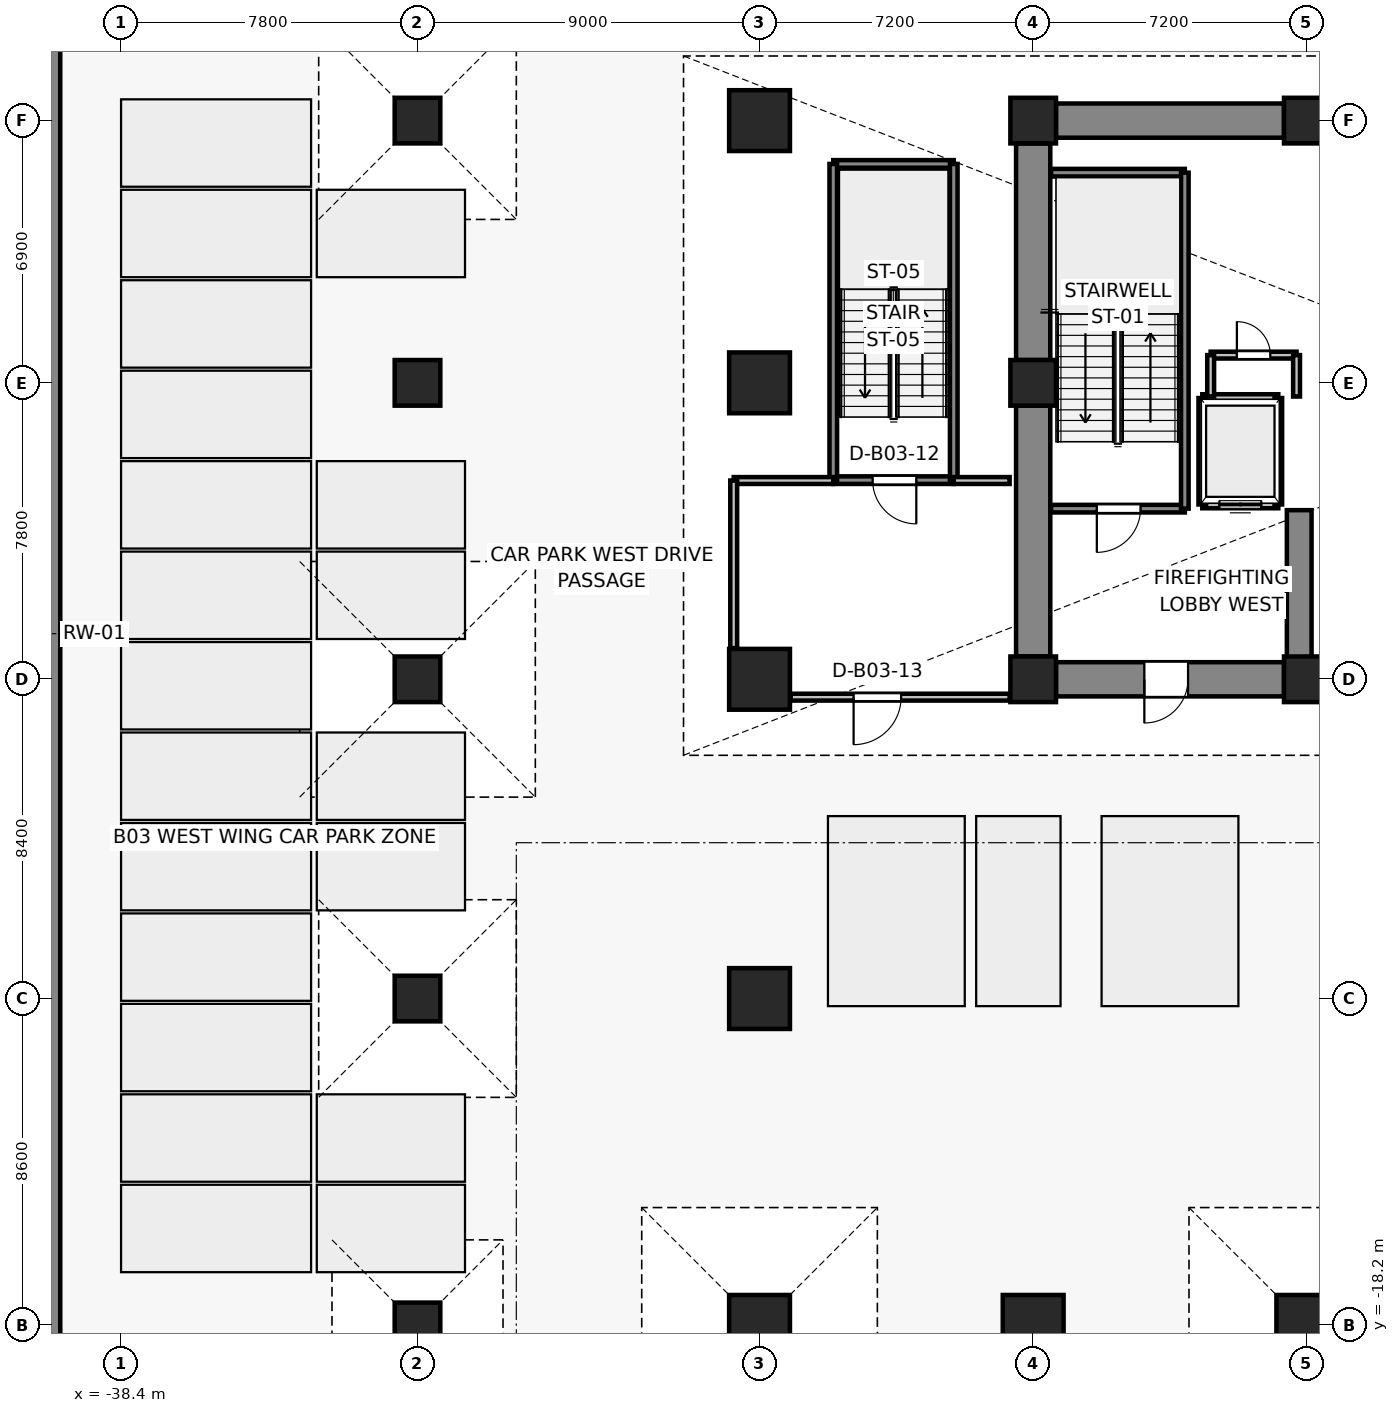
"""IFC4 building model, lengths in metres.
Left out: names, types, materials, properties, quantities, classifications, styles, units other than length and angle.
Written with IfcOpenShell. Run it as: python <this file> out.ifc"""

import sys

from ifc_helpers import new_model, si_unit, direction, frame, frame_2d, origin, origin_2d, place, context, subcontext, project, spatial, rectangle, extrude, source, transform, mapped, element, fill, save


model = new_model("IFC4")
c1 = context("Model", 3, precision=1e-05, world=origin(), true_north=direction((0.0, 1.0)))
c2 = subcontext(c1, "Body", "Model", "MODEL_VIEW")
j1 = project(units=[si_unit("LENGTHUNIT", "METRE"), si_unit("PLANEANGLEUNIT", "RADIAN")], contexts=[c1])
p1 = place(None, origin())
s1 = spatial("IfcSite", under=j1, at=p1, CompositionType="ELEMENT")
p2 = place(p1, origin())
s2 = spatial("IfcBuilding", under=s1, at=p2, CompositionType="ELEMENT")
p3 = place(p2, frame((0.0, 0.0, -13.2)))
s3 = spatial("IfcBuildingStorey", under=s2, at=p3, CompositionType="ELEMENT", Elevation=-13.2)
p4 = place(p3, frame((-40.4, -22.8, 0.0), z_axis=(0.0, 0.0, 1.0), x_axis=(0.0, 1.0, 0.0)))
e1 = element("IfcWall", 1, at=p4, inside=s3, PredefinedType="USERDEFINED", context=c2, shape_type="SweptSolid", body=[
    extrude(rectangle(XDim=45.6, YDim=0.8, at=frame_2d((22.8, 0.0))), origin(), (0.0, 0.0, 1.0), 4.12),
])
for number, where, z_axis, x_axis in (
    (2, (-14.4, -1.2, 0.0), (0.0, 0.0, 1.0), (1.0, 0.0, 0.0)),
    (3, (-7.2, -1.2, 0.0), (0.0, 0.0, 1.0), (1.0, 0.0, 0.0)),
    (4, (-14.4, 6.6, 0.0), (0.0, 0.0, 1.0), (1.0, 0.0, 0.0)),
    (5, (-14.4, 13.5, 0.0), (0.0, 0.0, 1.0), (1.0, 0.0, 0.0)),
    (6, (-7.2, 13.5, 0.0), (0.0, 0.0, 1.0), (1.0, 0.0, 0.0)),
):
    element("IfcColumn", number, at=place(p3, frame(where, z_axis=z_axis, x_axis=x_axis)), inside=s3, PredefinedType="COLUMN", context=c2, shape_type="SweptSolid", body=[
        extrude(rectangle(XDim=1.2, YDim=1.2, at=origin_2d()), origin(), (0.0, 0.0, 1.0), 4.4),
    ])
for number, where, z_axis, x_axis in (
    (7, (-21.6, -18.2, 0.0), (0.0, 0.0, 1.0), (1.0, 0.0, 0.0)),
    (8, (-14.4, -18.2, 0.0), (0.0, 0.0, 1.0), (1.0, 0.0, 0.0)),
    (9, (-7.2, -18.2, 0.0), (0.0, 0.0, 1.0), (1.0, 0.0, 0.0)),
    (10, (-21.6, -9.6, 0.0), (0.0, 0.0, 1.0), (1.0, 0.0, 0.0)),
    (11, (-21.6, -1.2, 0.0), (0.0, 0.0, 1.0), (1.0, 0.0, 0.0)),
    (12, (-21.6, 6.6, 0.0), (0.0, 0.0, 1.0), (1.0, 0.0, 0.0)),
    (13, (-21.6, 13.5, 0.0), (0.0, 0.0, 1.0), (1.0, 0.0, 0.0)),
):
    element("IfcColumn", number, at=place(p3, frame(where, z_axis=z_axis, x_axis=x_axis)), inside=s3, PredefinedType="COLUMN", context=c2, shape_type="SweptSolid", body=[
        extrude(rectangle(XDim=1.6, YDim=1.6, at=origin_2d()), origin(), (0.0, 0.0, 1.0), 4.4),
    ])
for number, where, z_axis, x_axis in (
    (14, (-30.6, -18.2, 0.0), (0.0, 0.0, 1.0), (1.0, 0.0, 0.0)),
    (15, (-30.6, -9.6, 0.0), (0.0, 0.0, 1.0), (1.0, 0.0, 0.0)),
    (16, (-30.6, -1.2, 0.0), (0.0, 0.0, 1.0), (1.0, 0.0, 0.0)),
    (17, (-30.6, 6.6, 0.0), (0.0, 0.0, 1.0), (1.0, 0.0, 0.0)),
    (18, (-30.6, 13.5, 0.0), (0.0, 0.0, 1.0), (1.0, 0.0, 0.0)),
):
    element("IfcColumn", number, at=place(p3, frame(where, z_axis=z_axis, x_axis=x_axis)), inside=s3, PredefinedType="COLUMN", context=c2, shape_type="SweptSolid", body=[
        extrude(rectangle(XDim=1.2, YDim=1.2, at=origin_2d()), origin(), (0.0, 0.0, 1.0), 4.4),
    ])
p5 = place(p3, frame((-13.8, 13.5, 0.0), z_axis=(0.0, 0.0, 1.0), x_axis=(1.0, 0.0, 0.0)))
e19 = element("IfcWall", 19, at=p5, inside=s3, PredefinedType="SHEAR", context=c2, shape_type="SweptSolid", body=[
    extrude(rectangle(XDim=6.0, YDim=0.9, at=frame_2d((3.0, 0.0))), origin(), (0.0, 0.0, 1.0), 4.12),
])
p6 = place(p3, frame((-14.4, -0.6, 0.0), z_axis=(0.0, 0.0, 1.0), x_axis=(0.0, 1.0, 0.0)))
e20 = element("IfcWall", 20, at=p6, inside=s3, PredefinedType="SHEAR", context=c2, shape_type="SweptSolid", body=[
    extrude(rectangle(XDim=6.6, YDim=0.9, at=frame_2d((3.3, 0.0))), origin(), (0.0, 0.0, 1.0), 4.12),
])
p7 = place(p3, frame((-14.4, 7.2, 0.0), z_axis=(0.0, 0.0, 1.0), x_axis=(0.0, 1.0, 0.0)))
e21 = element("IfcWall", 21, at=p7, inside=s3, PredefinedType="SHEAR", context=c2, shape_type="SweptSolid", body=[
    extrude(rectangle(XDim=5.7, YDim=0.9, at=frame_2d((2.85, 0.0))), origin(), (0.0, 0.0, 1.0), 4.12),
])
p8 = place(p3, frame((-7.8, -1.2, 0.0), z_axis=(0.0, 0.0, 1.0), x_axis=(-1.0, 0.0, 0.0)))
e22 = element("IfcWall", 22, at=p8, inside=s3, PredefinedType="SHEAR", context=c2, shape_type="SweptSolid", body=[
    extrude(rectangle(XDim=6.0, YDim=0.9, at=frame_2d((3.0, 0.0))), origin(), (0.0, 0.0, 1.0), 4.12),
])
p9 = place(p8, frame((2.525, 0.0, 0.0)))
e23 = element("IfcOpeningElement", 23, at=p9, cuts=e22, PredefinedType="OPENING", context=c2, shape_type="SweptSolid", body=[
    extrude(rectangle(XDim=1.15, YDim=2.15, at=frame_2d((0.575, 1.075))), frame((0.0, 0.46, 0.0), z_axis=(0.0, -1.0, 0.0), x_axis=(1.0, 0.0, 0.0)), (0.0, 0.0, 1.0), 0.92),
])
p10 = place(p3, frame((-7.4, -0.75, 0.0), z_axis=(0.0, 0.0, 1.0), x_axis=(0.0, 1.0, 0.0)))
e24 = element("IfcWall", 24, at=p10, inside=s3, PredefinedType="SHEAR", context=c2, shape_type="SweptSolid", body=[
    extrude(rectangle(XDim=4.0, YDim=0.65, at=frame_2d((2.0, 0.0))), origin(), (0.0, 0.0, 1.0), 4.12),
])
p11 = place(p3, frame((-7.95, 3.4, 0.0), z_axis=(0.0, 0.0, 1.0), x_axis=(-1.0, 0.0, 0.0)))
e25 = element("IfcWall", 25, at=p11, inside=s3, PredefinedType="SOLIDWALL", context=c2, shape_type="SweptSolid", body=[
    extrude(rectangle(XDim=2.0, YDim=0.2, at=frame_2d((1.0, 0.0))), origin(), (0.0, 0.0, 1.0), 4.12),
])
p12 = place(p11, frame((0.45, 0.0, 0.0)))
e26 = element("IfcOpeningElement", 26, at=p12, cuts=e25, PredefinedType="OPENING", context=c2, shape_type="SweptSolid", body=[
    extrude(rectangle(XDim=1.1, YDim=2.2, at=frame_2d((0.55, 1.1))), frame((0.0, 0.11, 0.0), z_axis=(0.0, -1.0, 0.0), x_axis=(1.0, 0.0, 0.0)), (0.0, 0.0, 1.0), 0.22),
])
p13 = place(p3, frame((-9.95, 6.2, 0.0), z_axis=(0.0, 0.0, 1.0), x_axis=(1.0, 0.0, 0.0)))
e27 = element("IfcWall", 27, at=p13, inside=s3, PredefinedType="SOLIDWALL", context=c2, shape_type="SweptSolid", body=[
    extrude(rectangle(XDim=2.0, YDim=0.2, at=frame_2d((1.0, 0.0))), origin(), (0.0, 0.0, 1.0), 4.12),
])
for number, where, z_axis, x_axis in (
    (28, (-9.95, 3.4, 0.0), (0.0, 0.0, 1.0), (0.0, 1.0, 0.0)),
    (29, (-7.95, 6.2, 0.0), (0.0, 0.0, 1.0), (0.0, -1.0, 0.0)),
):
    element("IfcWall", number, at=place(p3, frame(where, z_axis=z_axis, x_axis=x_axis)), inside=s3, PredefinedType="SOLIDWALL", context=c2, shape_type="SweptSolid", body=[
        extrude(rectangle(XDim=2.8, YDim=0.2, at=frame_2d((1.4, 0.0))), origin(), (0.0, 0.0, 1.0), 4.12),
    ])
p14 = place(p3, frame((-10.41, 3.29, 0.0), z_axis=(0.0, 0.0, 1.0), x_axis=(-1.0, 0.0, 0.0)))
e30 = element("IfcWall", 30, at=p14, inside=s3, PredefinedType="SOLIDWALL", context=c2, shape_type="SweptSolid", body=[
    extrude(rectangle(XDim=3.52, YDim=0.2, at=frame_2d((1.76, 0.0))), origin(), (0.0, 0.0, 1.0), 4.12),
])
p15 = place(p14, frame((1.165, 0.0, 0.0)))
e31 = element("IfcOpeningElement", 31, at=p15, cuts=e30, PredefinedType="OPENING", context=c2, shape_type="SweptSolid", body=[
    extrude(rectangle(XDim=1.15, YDim=2.15, at=frame_2d((0.575, 1.075))), frame((0.0, 0.11, 0.0), z_axis=(0.0, -1.0, 0.0), x_axis=(1.0, 0.0, 0.0)), (0.0, 0.0, 1.0), 0.22),
])
p16 = place(p3, frame((-13.93, 12.13, 0.0), z_axis=(0.0, 0.0, 1.0), x_axis=(1.0, 0.0, 0.0)))
e32 = element("IfcWall", 32, at=p16, inside=s3, PredefinedType="SOLIDWALL", context=c2, shape_type="SweptSolid", body=[
    extrude(rectangle(XDim=3.52, YDim=0.2, at=frame_2d((1.76, 0.0))), origin(), (0.0, 0.0, 1.0), 4.12),
])
p17 = place(p3, frame((-10.41, 12.13, 0.0), z_axis=(0.0, 0.0, 1.0), x_axis=(0.0, -1.0, 0.0)))
e33 = element("IfcWall", 33, at=p17, inside=s3, PredefinedType="SOLIDWALL", context=c2, shape_type="SweptSolid", body=[
    extrude(rectangle(XDim=8.84, YDim=0.2, at=frame_2d((4.42, 0.0))), origin(), (0.0, 0.0, 1.0), 4.12),
])
p18 = place(p3, frame((-9.73, 7.33, 0.0), z_axis=(0.0, 0.0, 1.0), x_axis=(1.0, 0.0, 0.0)))
e34 = element("IfcWall", 34, at=p18, inside=s3, PredefinedType="PARTITIONING", context=c2, shape_type="SweptSolid", body=[
    extrude(rectangle(XDim=2.26, YDim=0.18, at=frame_2d((1.13, 0.0))), origin(), (0.0, 0.0, 1.0), 3.41),
])
p19 = place(p18, frame((0.69, 0.0, 0.0)))
e35 = element("IfcOpeningElement", 35, at=p19, cuts=e34, PredefinedType="OPENING", context=c2, shape_type="SweptSolid", body=[
    extrude(rectangle(XDim=0.88, YDim=2.1, at=frame_2d((0.44, 1.05))), frame((0.0, 0.1, 0.0), z_axis=(0.0, -1.0, 0.0), x_axis=(1.0, 0.0, 0.0)), (0.0, 0.0, 1.0), 0.2),
])
p20 = place(p3, frame((-9.73, 6.24, 0.0), z_axis=(0.0, 0.0, 1.0), x_axis=(0.0, 1.0, 0.0)))
e36 = element("IfcWall", 36, at=p20, inside=s3, PredefinedType="PARTITIONING", context=c2, shape_type="SweptSolid", body=[
    extrude(rectangle(XDim=1.09, YDim=0.18, at=frame_2d((0.545, 0.0))), origin(), (0.0, 0.0, 1.0), 4.12),
])
p21 = place(p3, frame((-7.47, 7.33, 0.0), z_axis=(0.0, 0.0, 1.0), x_axis=(0.0, -1.0, 0.0)))
e37 = element("IfcWall", 37, at=p21, inside=s3, PredefinedType="PARTITIONING", context=c2, shape_type="SweptSolid", body=[
    extrude(rectangle(XDim=1.09, YDim=0.18, at=frame_2d((0.545, 0.0))), origin(), (0.0, 0.0, 1.0), 3.41),
])
p22 = place(p3, frame((-16.49, 4.04, 0.0), z_axis=(0.0, 0.0, 1.0), x_axis=(-1.0, 0.0, 0.0)))
e38 = element("IfcWall", 38, at=p22, inside=s3, PredefinedType="SOLIDWALL", context=c2, shape_type="SweptSolid", body=[
    extrude(rectangle(XDim=3.17, YDim=0.2, at=frame_2d((1.585, 0.0))), origin(), (0.0, 0.0, 1.0), 4.12),
])
p23 = place(p22, frame((0.985, 0.0, 0.0)))
e39 = element("IfcOpeningElement", 39, at=p23, cuts=e38, PredefinedType="OPENING", context=c2, shape_type="SweptSolid", body=[
    extrude(rectangle(XDim=1.15, YDim=2.15, at=frame_2d((0.575, 1.075))), frame((0.0, 0.11, 0.0), z_axis=(0.0, -1.0, 0.0), x_axis=(1.0, 0.0, 0.0)), (0.0, 0.0, 1.0), 0.22),
])
p24 = place(p3, frame((-19.66, 12.36, 0.0), z_axis=(0.0, 0.0, 1.0), x_axis=(1.0, 0.0, 0.0)))
e40 = element("IfcWall", 40, at=p24, inside=s3, PredefinedType="SOLIDWALL", context=c2, shape_type="SweptSolid", body=[
    extrude(rectangle(XDim=3.17, YDim=0.2, at=frame_2d((1.585, 0.0))), origin(), (0.0, 0.0, 1.0), 4.12),
])
for number, where, z_axis, x_axis in (
    (41, (-19.66, 4.04, 0.0), (0.0, 0.0, 1.0), (0.0, 1.0, 0.0)),
    (42, (-16.49, 12.36, 0.0), (0.0, 0.0, 1.0), (0.0, -1.0, 0.0)),
):
    element("IfcWall", number, at=place(p3, frame(where, z_axis=z_axis, x_axis=x_axis)), inside=s3, PredefinedType="SOLIDWALL", context=c2, shape_type="SweptSolid", body=[
        extrude(rectangle(XDim=8.32, YDim=0.2, at=frame_2d((4.16, 0.0))), origin(), (0.0, 0.0, 1.0), 4.12),
    ])
p25 = place(p3, frame((-15.02, -1.67, 0.0), z_axis=(0.0, 0.0, 1.0), x_axis=(-1.0, 0.0, 0.0)))
e43 = element("IfcWall", 43, at=p25, inside=s3, PredefinedType="PARTITIONING", context=c2, shape_type="SweptSolid", body=[
    extrude(rectangle(XDim=5.76, YDim=0.18, at=frame_2d((2.88, 0.0))), origin(), (0.0, 0.0, 1.0), 4.12),
])
p26 = place(p25, frame((2.855, 0.0, 0.0)))
e44 = element("IfcOpeningElement", 44, at=p26, cuts=e43, PredefinedType="OPENING", context=c2, shape_type="SweptSolid", body=[
    extrude(rectangle(XDim=1.25, YDim=2.15, at=frame_2d((0.625, 1.075))), frame((0.0, 0.1, 0.0), z_axis=(0.0, -1.0, 0.0), x_axis=(1.0, 0.0, 0.0)), (0.0, 0.0, 1.0), 0.2),
])
p27 = place(p3, frame((-22.28, 4.03, 0.0), z_axis=(0.0, 0.0, 1.0), x_axis=(1.0, 0.0, 0.0)))
e45 = element("IfcWall", 45, at=p27, inside=s3, PredefinedType="PARTITIONING", context=c2, shape_type="SweptSolid", body=[
    extrude(rectangle(XDim=2.62, YDim=0.18, at=frame_2d((1.31, 0.0))), origin(), (0.0, 0.0, 1.0), 3.41),
])
p28 = place(p3, frame((-16.49, 4.03, 0.0), z_axis=(0.0, 0.0, 1.0), x_axis=(1.0, 0.0, 0.0)))
e46 = element("IfcWall", 46, at=p28, inside=s3, PredefinedType="PARTITIONING", context=c2, shape_type="SweptSolid", body=[
    extrude(rectangle(XDim=1.47, YDim=0.18, at=frame_2d((0.735, 0.0))), origin(), (0.0, 0.0, 1.0), 4.12),
])
p29 = place(p3, frame((-22.28, -0.38, 0.0), z_axis=(0.0, 0.0, 1.0), x_axis=(0.0, 1.0, 0.0)))
e47 = element("IfcWall", 47, at=p29, inside=s3, PredefinedType="PARTITIONING", context=c2, shape_type="SweptSolid", body=[
    extrude(rectangle(XDim=4.41, YDim=0.18, at=frame_2d((2.205, 0.0))), origin(), (0.0, 0.0, 1.0), 3.493),
])
m1 = source(origin(), c2, "Body", "SweptSolid", [
    extrude(rectangle(XDim=1.1, YDim=2.2, at=frame_2d((0.55, 1.1))), frame((0.0, 0.025, 0.0), z_axis=(0.0, -1.0, 0.0), x_axis=(1.0, 0.0, 0.0)), (0.0, 0.0, 1.0), 0.05),
])
p30 = place(p12, origin())
e48 = element("IfcDoor", 48, at=p30, inside=s3, OperationType="DOUBLE_DOOR_SLIDING", PredefinedType="DOOR", context=c2, shape_type="MappedRepresentation", body=[
    mapped(m1, transform((0.0, 0.0, 0.0), x_axis=(1.0, 0.0, 0.0), y_axis=(0.0, 1.0, 0.0), z_axis=(0.0, 0.0, 1.0), scale=1.0)),
])
fill(e26, e48)
m2 = source(origin(), c2, "Body", "SweptSolid", [
    extrude(rectangle(XDim=1.15, YDim=2.15, at=frame_2d((0.575, 1.075))), frame((0.0, 0.025, 0.0), z_axis=(0.0, -1.0, 0.0), x_axis=(1.0, 0.0, 0.0)), (0.0, 0.0, 1.0), 0.05),
])
p31 = place(p15, origin())
e49 = element("IfcDoor", 49, at=p31, inside=s3, OperationType="SINGLE_SWING_RIGHT", PredefinedType="DOOR", context=c2, shape_type="MappedRepresentation", body=[
    mapped(m2, transform((0.0, 0.0, 0.0), x_axis=(1.0, 0.0, 0.0), y_axis=(0.0, 1.0, 0.0), z_axis=(0.0, 0.0, 1.0), scale=1.0)),
])
fill(e31, e49)
p32 = place(p9, origin())
e50 = element("IfcDoor", 50, at=p32, inside=s3, OperationType="SINGLE_SWING_RIGHT", PredefinedType="DOOR", context=c2, shape_type="MappedRepresentation", body=[
    mapped(m2, transform((0.0, 0.0, 0.0), x_axis=(1.0, 0.0, 0.0), y_axis=(0.0, 1.0, 0.0), z_axis=(0.0, 0.0, 1.0), scale=1.0)),
])
fill(e23, e50)
p33 = place(p23, origin())
e51 = element("IfcDoor", 51, at=p33, inside=s3, OperationType="SINGLE_SWING_LEFT", PredefinedType="DOOR", context=c2, shape_type="MappedRepresentation", body=[
    mapped(m2, transform((0.0, 0.0, 0.0), x_axis=(1.0, 0.0, 0.0), y_axis=(0.0, 1.0, 0.0), z_axis=(0.0, 0.0, 1.0), scale=1.0)),
])
fill(e39, e51)
m3 = source(origin(), c2, "Body", "SweptSolid", [
    extrude(rectangle(XDim=1.25, YDim=2.15, at=frame_2d((0.625, 1.075))), frame((0.0, 0.025, 0.0), z_axis=(0.0, -1.0, 0.0), x_axis=(1.0, 0.0, 0.0)), (0.0, 0.0, 1.0), 0.05),
])
p34 = place(p26, origin())
e52 = element("IfcDoor", 52, at=p34, inside=s3, OperationType="SINGLE_SWING_RIGHT", PredefinedType="DOOR", context=c2, shape_type="MappedRepresentation", body=[
    mapped(m3, transform((0.0, 0.0, 0.0), x_axis=(1.0, 0.0, 0.0), y_axis=(0.0, 1.0, 0.0), z_axis=(0.0, 0.0, 1.0), scale=1.0)),
])
fill(e44, e52)
m4 = source(origin(), c2, "Body", "SweptSolid", [
    extrude(rectangle(XDim=0.88, YDim=2.1, at=frame_2d((0.44, 1.05))), frame((0.0, 0.025, 0.0), z_axis=(0.0, -1.0, 0.0), x_axis=(1.0, 0.0, 0.0)), (0.0, 0.0, 1.0), 0.05),
])
p35 = place(p19, origin())
e53 = element("IfcDoor", 53, at=p35, inside=s3, OperationType="SINGLE_SWING_LEFT", PredefinedType="DOOR", context=c2, shape_type="MappedRepresentation", body=[
    mapped(m4, transform((0.0, 0.0, 0.0), x_axis=(1.0, 0.0, 0.0), y_axis=(0.0, 1.0, 0.0), z_axis=(0.0, 0.0, 1.0), scale=1.0)),
])
fill(e35, e53)
save(model, sys.argv[1])
